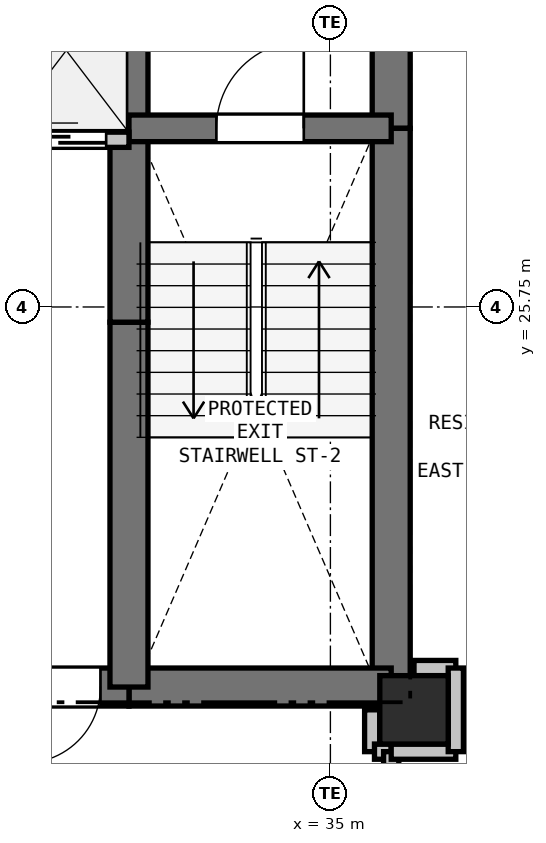
"""IFC4 building model, lengths in metres.
Left out: names, types, materials, properties, quantities, classifications, styles, units other than length and angle.
Written with IfcOpenShell. Run it as: python <this file> out.ifc"""

import sys

from ifc_helpers import new_model, si_unit, direction, frame, frame_2d, origin, origin_2d, place, context, subcontext, project, spatial, rectangle, extrude, element, fill, save


model = new_model("IFC4")
c1 = context("Model", 3, precision=1e-05, world=origin(), true_north=direction((0.0, 1.0)))
c2 = subcontext(c1, "Body", "Model", "MODEL_VIEW")
j1 = project(units=[si_unit("LENGTHUNIT", "METRE"), si_unit("PLANEANGLEUNIT", "RADIAN")], contexts=[c1])
p1 = place(None, origin())
s1 = spatial("IfcSite", under=j1, at=p1, CompositionType="ELEMENT")
p2 = place(p1, origin())
s2 = spatial("IfcBuilding", under=s1, at=p2, CompositionType="ELEMENT")
p3 = place(p2, frame((0.0, 0.0, 58.8)))
s3 = spatial("IfcBuildingStorey", under=s2, at=p3, CompositionType="ELEMENT", Elevation=58.8)
p4 = place(p3, frame((36.1, 20.45, 0.0), z_axis=(0.0, 0.0, 1.0), x_axis=(1.0, 0.0, 0.0)))
e1 = element("IfcColumn", 1, at=p4, inside=s3, PredefinedType="COLUMN", context=c2, shape_type="SweptSolid", body=[
    extrude(rectangle(XDim=0.9, YDim=0.9, at=origin_2d()), origin(), (0.0, 0.0, 1.0), 3.3),
])
p5 = place(p3, frame((35.8, 32.75, 0.0), z_axis=(0.0, 0.0, 1.0), x_axis=(0.0, -1.0, 0.0)))
e2 = element("IfcWall", 2, at=p5, inside=s3, PredefinedType="SHEAR", context=c2, shape_type="SweptSolid", body=[
    extrude(rectangle(XDim=4.65, YDim=0.5, at=frame_2d((2.325, 0.0))), origin(), (0.0, 0.0, 1.0), 3.02),
])
p6 = place(p3, frame((35.8, 28.1, 0.0), z_axis=(0.0, 0.0, 1.0), x_axis=(0.0, -1.0, 0.0)))
e3 = element("IfcWall", 3, at=p6, inside=s3, PredefinedType="SHEAR", context=c2, shape_type="SweptSolid", body=[
    extrude(rectangle(XDim=7.35, YDim=0.5, at=frame_2d((3.675, 0.0))), origin(), (0.0, 0.0, 1.0), 3.02),
])
p7 = place(p3, frame((35.8, 20.75, 0.0), z_axis=(0.0, 0.0, 1.0), x_axis=(-1.0, 0.0, 0.0)))
e4 = element("IfcWall", 4, at=p7, inside=s3, PredefinedType="SHEAR", context=c2, shape_type="SweptSolid", body=[
    extrude(rectangle(XDim=3.45, YDim=0.5, at=frame_2d((1.725, 0.0))), origin(), (0.0, 0.0, 1.0), 3.02),
])
p8 = place(p3, frame((32.35, 20.75, 0.0), z_axis=(0.0, 0.0, 1.0), x_axis=(-1.0, 0.0, 0.0)))
e5 = element("IfcWall", 5, at=p8, inside=s3, PredefinedType="SHEAR", context=c2, shape_type="SweptSolid", body=[
    extrude(rectangle(XDim=1.75, YDim=0.5, at=frame_2d((0.875, 0.0))), origin(), (0.0, 0.0, 1.0), 3.02),
])
p9 = place(p8, frame((0.375, 0.0, 0.0)))
e6 = element("IfcOpeningElement", 6, at=p9, cuts=e5, PredefinedType="OPENING", context=c2, shape_type="SweptSolid", body=[
    extrude(rectangle(XDim=1.0, YDim=2.15, at=frame_2d((0.5, 1.075))), frame((0.0, 0.26, 0.0), z_axis=(0.0, -1.0, 0.0), x_axis=(1.0, 0.0, 0.0)), (0.0, 0.0, 1.0), 0.52),
])
p10 = place(p3, frame((32.35, 20.75, 0.0), z_axis=(0.0, 0.0, 1.0), x_axis=(0.0, 1.0, 0.0)))
e7 = element("IfcWall", 7, at=p10, inside=s3, PredefinedType="SHEAR", context=c2, shape_type="SweptSolid", body=[
    extrude(rectangle(XDim=4.8, YDim=0.5, at=frame_2d((2.4, 0.0))), origin(), (0.0, 0.0, 1.0), 3.02),
])
p11 = place(p3, frame((32.35, 25.55, 0.0), z_axis=(0.0, 0.0, 1.0), x_axis=(0.0, 1.0, 0.0)))
e8 = element("IfcWall", 8, at=p11, inside=s3, PredefinedType="SHEAR", context=c2, shape_type="SweptSolid", body=[
    extrude(rectangle(XDim=2.4, YDim=0.5, at=frame_2d((1.2, 0.0))), origin(), (0.0, 0.0, 1.0), 3.02),
])
p12 = place(p3, frame((32.35, 27.95, 0.0), z_axis=(0.0, 0.0, 1.0), x_axis=(0.0, 1.0, 0.0)))
e9 = element("IfcWall", 9, at=p12, inside=s3, PredefinedType="SHEAR", context=c2, shape_type="SweptSolid", body=[
    extrude(rectangle(XDim=2.8, YDim=0.5, at=frame_2d((1.4, 0.0))), origin(), (0.0, 0.0, 1.0), 3.02),
])
p13 = place(p3, frame((32.35, 28.1, 0.0), z_axis=(0.0, 0.0, 1.0), x_axis=(1.0, 0.0, 0.0)))
e10 = element("IfcWall", 10, at=p13, inside=s3, PredefinedType="SHEAR", context=c2, shape_type="SweptSolid", body=[
    extrude(rectangle(XDim=3.45, YDim=0.35, at=frame_2d((1.725, 0.0))), origin(), (0.0, 0.0, 1.0), 3.02),
])
p14 = place(p13, frame((1.15, 0.0, 0.0)))
e11 = element("IfcOpeningElement", 11, at=p14, cuts=e10, PredefinedType="OPENING", context=c2, shape_type="SweptSolid", body=[
    extrude(rectangle(XDim=1.15, YDim=2.15, at=frame_2d((0.575, 1.075))), frame((0.0, 0.185, 0.0), z_axis=(0.0, -1.0, 0.0), x_axis=(1.0, 0.0, 0.0)), (0.0, 0.0, 1.0), 0.37),
])
p15 = place(p3, frame((27.4, 27.95, 0.0), z_axis=(0.0, 0.0, 1.0), x_axis=(1.0, 0.0, 0.0)))
e12 = element("IfcWall", 12, at=p15, inside=s3, PredefinedType="PARTITIONING", context=c2, shape_type="SweptSolid", body=[
    extrude(rectangle(XDim=4.95, YDim=0.2, at=frame_2d((2.475, 0.0))), origin(), (0.0, 0.0, 1.0), 3.02),
])
p16 = place(p15, frame((0.25, 0.0, 0.0)))
e13 = element("IfcOpeningElement", 13, at=p16, cuts=e12, PredefinedType="OPENING", context=c2, shape_type="SweptSolid", body=[
    extrude(rectangle(XDim=1.1, YDim=2.15, at=frame_2d((0.55, 1.075))), frame((0.0, 0.11, 0.0), z_axis=(0.0, -1.0, 0.0), x_axis=(1.0, 0.0, 0.0)), (0.0, 0.0, 1.0), 0.22),
])
p17 = place(p15, frame((1.9, 0.0, 0.0)))
e14 = element("IfcOpeningElement", 14, at=p17, cuts=e12, PredefinedType="OPENING", context=c2, shape_type="SweptSolid", body=[
    extrude(rectangle(XDim=1.1, YDim=2.15, at=frame_2d((0.55, 1.075))), frame((0.0, 0.11, 0.0), z_axis=(0.0, -1.0, 0.0), x_axis=(1.0, 0.0, 0.0)), (0.0, 0.0, 1.0), 0.22),
])
p18 = place(p15, frame((3.55, 0.0, 0.0)))
e15 = element("IfcOpeningElement", 15, at=p18, cuts=e12, PredefinedType="OPENING", context=c2, shape_type="SweptSolid", body=[
    extrude(rectangle(XDim=1.1, YDim=2.15, at=frame_2d((0.55, 1.075))), frame((0.0, 0.11, 0.0), z_axis=(0.0, -1.0, 0.0), x_axis=(1.0, 0.0, 0.0)), (0.0, 0.0, 1.0), 0.22),
])
p19 = place(p3, frame((35.55, 20.45, 0.0), z_axis=(0.0, 0.0, 1.0), x_axis=(0.0, -1.0, 0.0)))
e16 = element("IfcWall", 16, at=p19, inside=s3, PredefinedType="PARTITIONING", context=c2, shape_type="SweptSolid", body=[
    extrude(rectangle(XDim=0.55, YDim=0.2, at=frame_2d((0.275, 0.0))), origin(), (0.0, 0.0, 1.0), 2.468),
])
p20 = place(p3, frame((35.58, 19.9, 0.0), z_axis=(0.0, 0.0, 1.0), x_axis=(1.0, 0.0, 0.0)))
e17 = element("IfcWall", 17, at=p20, inside=s3, PredefinedType="PARTITIONING", context=c2, shape_type="SweptSolid", body=[
    extrude(rectangle(XDim=0.22, YDim=0.2, at=frame_2d((0.11, 0.0))), origin(), (0.0, 0.0, 1.0), 3.02),
])
p21 = place(p3, frame((35.8, 19.9, 0.0), z_axis=(0.0, 0.0, 1.0), x_axis=(0.0, -1.0, 0.0)))
e18 = element("IfcWall", 18, at=p21, inside=s3, PredefinedType="PARTITIONING", context=c2, shape_type="SweptSolid", body=[
    extrude(rectangle(XDim=1.75, YDim=0.2, at=frame_2d((0.875, 0.0))), origin(), (0.0, 0.0, 1.0), 3.02),
])
p22 = place(p21, frame((0.375, 0.0, 0.0)))
e19 = element("IfcOpeningElement", 19, at=p22, cuts=e18, PredefinedType="OPENING", context=c2, shape_type="SweptSolid", body=[
    extrude(rectangle(XDim=1.0, YDim=2.15, at=frame_2d((0.5, 1.075))), frame((0.0, 0.11, 0.0), z_axis=(0.0, -1.0, 0.0), x_axis=(1.0, 0.0, 0.0)), (0.0, 0.0, 1.0), 0.22),
])
p23 = place(p3, frame((36.65, 21.0, 0.0), z_axis=(0.0, 0.0, 1.0), x_axis=(-1.0, 0.0, 0.0)))
e20 = element("IfcWall", 20, at=p23, inside=s3, PredefinedType="PARTITIONING", context=c2, shape_type="SweptSolid", body=[
    extrude(rectangle(XDim=0.55, YDim=0.2, at=frame_2d((0.275, 0.0))), origin(), (0.0, 0.0, 1.0), 2.468),
])
p24 = place(p3, frame((35.8, 19.9, 0.0), z_axis=(0.0, 0.0, 1.0), x_axis=(1.0, 0.0, 0.0)))
e21 = element("IfcWall", 21, at=p24, inside=s3, PredefinedType="PARTITIONING", context=c2, shape_type="SweptSolid", body=[
    extrude(rectangle(XDim=0.85, YDim=0.2, at=frame_2d((0.425, 0.0))), origin(), (0.0, 0.0, 1.0), 2.317),
])
p25 = place(p3, frame((36.65, 19.9, 0.0), z_axis=(0.0, 0.0, 1.0), x_axis=(0.0, 1.0, 0.0)))
e22 = element("IfcWall", 22, at=p25, inside=s3, PredefinedType="PARTITIONING", context=c2, shape_type="SweptSolid", body=[
    extrude(rectangle(XDim=1.1, YDim=0.2, at=frame_2d((0.55, 0.0))), origin(), (0.0, 0.0, 1.0), 3.02),
])
p26 = place(p18, origin())
e23 = element("IfcDoor", 23, at=p26, inside=s3, OperationType="SLIDING_TO_LEFT", PredefinedType="DOOR", context=c2, shape_type="SweptSolid", body=[
    extrude(rectangle(XDim=1.1, YDim=2.15, at=frame_2d((0.55, 1.075))), frame((0.0, 0.025, 0.0), z_axis=(0.0, -1.0, 0.0), x_axis=(1.0, 0.0, 0.0)), (0.0, 0.0, 1.0), 0.05),
])
fill(e15, e23)
p27 = place(p9, origin())
e24 = element("IfcDoor", 24, at=p27, inside=s3, OperationType="SINGLE_SWING_RIGHT", PredefinedType="DOOR", context=c2, shape_type="SweptSolid", body=[
    extrude(rectangle(XDim=1.0, YDim=2.15, at=frame_2d((0.5, 1.075))), frame((0.0, 0.025, 0.0), z_axis=(0.0, -1.0, 0.0), x_axis=(1.0, 0.0, 0.0)), (0.0, 0.0, 1.0), 0.05),
])
fill(e6, e24)
p28 = place(p14, origin())
e25 = element("IfcDoor", 25, at=p28, inside=s3, OperationType="SINGLE_SWING_RIGHT", PredefinedType="DOOR", context=c2, shape_type="SweptSolid", body=[
    extrude(rectangle(XDim=1.15, YDim=2.15, at=frame_2d((0.575, 1.075))), frame((0.0, 0.025, 0.0), z_axis=(0.0, -1.0, 0.0), x_axis=(1.0, 0.0, 0.0)), (0.0, 0.0, 1.0), 0.05),
])
fill(e11, e25)
save(model, sys.argv[1])
